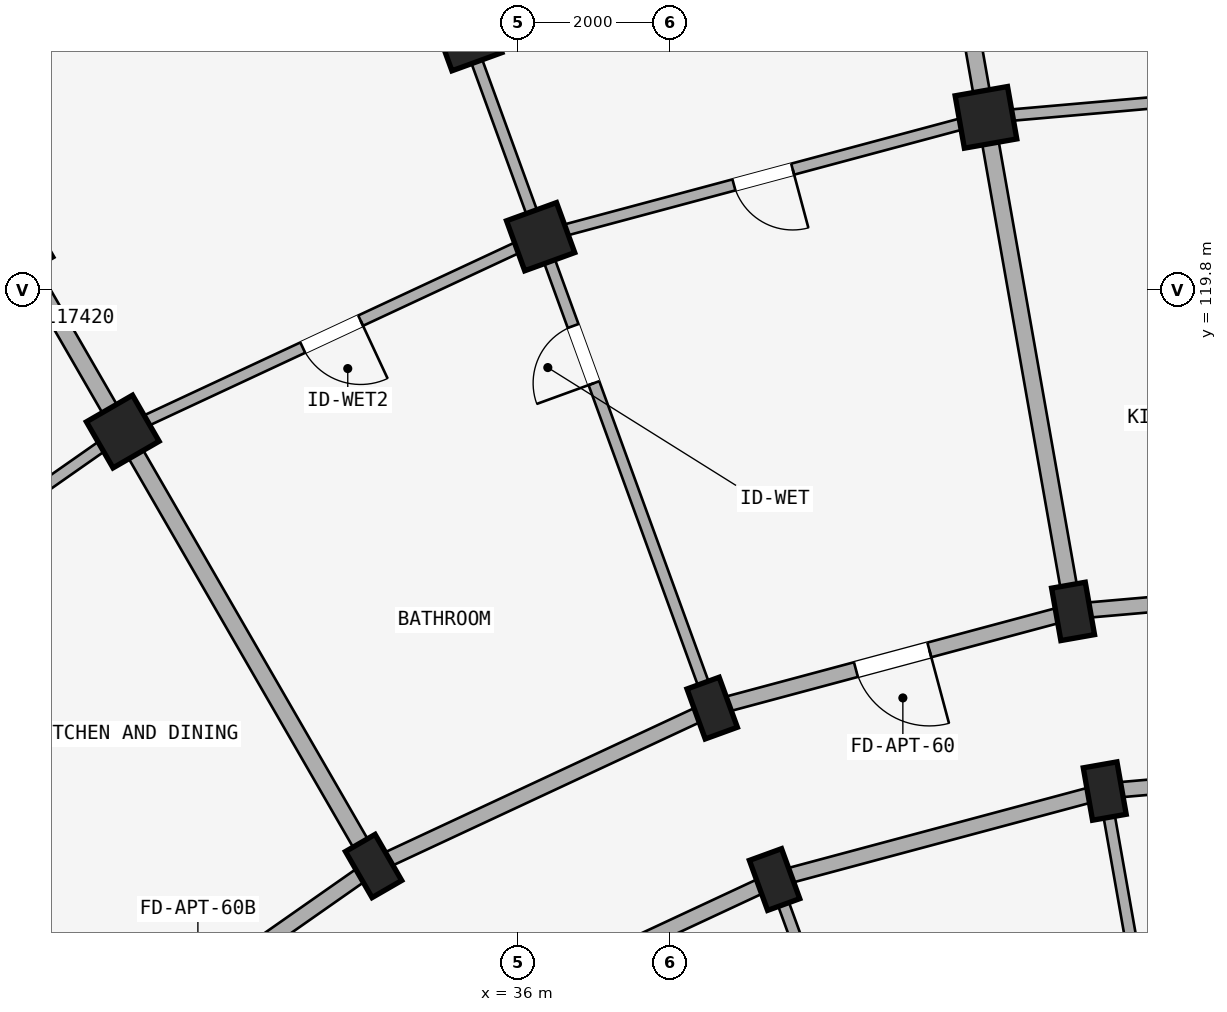
"""IFC4 building model, lengths in metres.
Left out: names, types, materials, properties, quantities, classifications, styles, units other than length and angle.
Written with IfcOpenShell. Run it as: python <this file> out.ifc"""

import sys

from ifc_helpers import new_model, si_unit, direction, frame, frame_2d, origin, origin_2d, place, context, subcontext, project, spatial, rectangle, extrude, element, fill, save


model = new_model("IFC4")
c1 = context("Model", 3, precision=1e-05, world=origin(), true_north=direction((0.0, 1.0)))
c2 = subcontext(c1, "Body", "Model", "MODEL_VIEW")
j1 = project(units=[si_unit("LENGTHUNIT", "METRE"), si_unit("PLANEANGLEUNIT", "RADIAN")], contexts=[c1])
p1 = place(None, origin())
s1 = spatial("IfcSite", under=j1, at=p1, CompositionType="ELEMENT")
p2 = place(p1, origin())
s2 = spatial("IfcBuilding", under=s1, at=p2, CompositionType="ELEMENT")
p3 = place(p2, frame((0.0, 0.0, 18.15)))
s3 = spatial("IfcBuildingStorey", under=s2, at=p3, CompositionType="ELEMENT", Elevation=18.15)
for number, where, z_axis, x_axis in (
    (1, (43.72, 113.208, 0.0), (0.0, 0.0, 1.0), (0.985, 0.174, 0.0)),
    (2, (43.303, 115.572, 0.0), (0.0, 0.0, 1.0), (0.985, 0.174, 0.0)),
):
    element("IfcColumn", number, at=place(p3, frame(where, z_axis=z_axis, x_axis=x_axis)), inside=s3, PredefinedType="COLUMN", context=c2, shape_type="SweptSolid", body=[
        extrude(rectangle(XDim=0.45, YDim=0.7, at=origin_2d()), origin(), (0.0, 0.0, 1.0), 2.93),
    ])
p4 = place(p3, frame((42.157, 122.071, 0.0), z_axis=(0.0, 0.0, 1.0), x_axis=(0.984807753012, 0.173648177667, 0.0)))
e3 = element("IfcColumn", 3, at=p4, inside=s3, PredefinedType="COLUMN", context=c2, shape_type="SweptSolid", body=[
    extrude(rectangle(XDim=0.7, YDim=0.7, at=origin_2d()), origin(), (0.0, 0.0, 1.0), 2.93),
])
for number, where, z_axis, x_axis in (
    (4, (39.376, 112.044, 0.0), (0.0, 0.0, 1.0), (0.94, 0.342, 0.0)),
    (5, (38.555, 114.299, 0.0), (0.0, 0.0, 1.0), (0.94, 0.342, 0.0)),
):
    element("IfcColumn", number, at=place(p3, frame(where, z_axis=z_axis, x_axis=x_axis)), inside=s3, PredefinedType="COLUMN", context=c2, shape_type="SweptSolid", body=[
        extrude(rectangle(XDim=0.45, YDim=0.7, at=origin_2d()), origin(), (0.0, 0.0, 1.0), 2.93),
    ])
for number, where, z_axis, x_axis in (
    (6, (36.298, 120.501, 0.0), (0.0, 0.0, 1.0), (0.94, 0.342, 0.0)),
    (7, (35.34, 123.132, 0.0), (0.0, 0.0, 1.0), (0.94, 0.342, 0.0)),
):
    element("IfcColumn", number, at=place(p3, frame(where, z_axis=z_axis, x_axis=x_axis)), inside=s3, PredefinedType="COLUMN", context=c2, shape_type="SweptSolid", body=[
        extrude(rectangle(XDim=0.7, YDim=0.7, at=origin_2d()), origin(), (0.0, 0.0, 1.0), 2.93),
    ])
p5 = place(p3, frame((34.1, 112.222, 0.0), z_axis=(0.0, 0.0, 1.0), x_axis=(0.866025403784, 0.5, 0.0)))
e8 = element("IfcColumn", 8, at=p5, inside=s3, PredefinedType="COLUMN", context=c2, shape_type="SweptSolid", body=[
    extrude(rectangle(XDim=0.45, YDim=0.7, at=origin_2d()), origin(), (0.0, 0.0, 1.0), 2.93),
])
for number, where, z_axis, x_axis in (
    (9, (30.8, 117.938, 0.0), (0.0, 0.0, 1.0), (0.866, 0.5, 0.0)),
    (10, (29.4, 120.363, 0.0), (0.0, 0.0, 1.0), (0.866, 0.5, 0.0)),
):
    element("IfcColumn", number, at=place(p3, frame(where, z_axis=z_axis, x_axis=x_axis)), inside=s3, PredefinedType="COLUMN", context=c2, shape_type="SweptSolid", body=[
        extrude(rectangle(XDim=0.7, YDim=0.7, at=origin_2d()), origin(), (0.0, 0.0, 1.0), 2.93),
    ])
p6 = place(p3, frame((48.2, 113.6, 0.0), z_axis=(0.0, 0.0, 1.0), x_axis=(-0.996191949488, -0.087187153726, 0.0)))
e11 = element("IfcWall", 11, at=p6, inside=s3, PredefinedType="STANDARD", context=c2, shape_type="SweptSolid", body=[
    extrude(rectangle(XDim=4.497, YDim=0.2, at=frame_2d((2.249, 0.0))), origin(), (0.0, 0.0, 1.0), 2.372),
])
p7 = place(p6, frame((1.729, 0.0, 0.0)))
e12 = element("IfcOpeningElement", 12, at=p7, cuts=e11, PredefinedType="OPENING", context=c2, shape_type="SweptSolid", body=[
    extrude(rectangle(XDim=1.04, YDim=2.15, at=frame_2d((0.52, 1.075))), frame((0.0, 0.11, 0.0), z_axis=(0.0, -1.0, 0.0), x_axis=(1.0, 0.0, 0.0)), (0.0, 0.0, 1.0), 0.22),
])
p8 = place(p3, frame((48.2, 116.0, 0.0), z_axis=(0.0, 0.0, 1.0), x_axis=(-0.996193663584, -0.087167566415, 0.0)))
e13 = element("IfcWall", 13, at=p8, inside=s3, PredefinedType="STANDARD", context=c2, shape_type="SweptSolid", body=[
    extrude(rectangle(XDim=4.916, YDim=0.2, at=frame_2d((2.458, 0.0))), origin(), (0.0, 0.0, 1.0), 2.372),
])
p9 = place(p8, frame((1.888, 0.0, 0.0)))
e14 = element("IfcOpeningElement", 14, at=p9, cuts=e13, PredefinedType="OPENING", context=c2, shape_type="SweptSolid", body=[
    extrude(rectangle(XDim=1.14, YDim=2.15, at=frame_2d((0.57, 1.075))), frame((0.0, 0.11, 0.0), z_axis=(0.0, -1.0, 0.0), x_axis=(1.0, 0.0, 0.0)), (0.0, 0.0, 1.0), 0.22),
])
p10 = place(p3, frame((43.72, 113.208, 0.0), z_axis=(0.0, 0.0, 1.0), x_axis=(-0.965934240054, -0.258787642463, 0.0)))
e15 = element("IfcWall", 15, at=p10, inside=s3, PredefinedType="STANDARD", context=c2, shape_type="SweptSolid", body=[
    extrude(rectangle(XDim=4.497, YDim=0.2, at=frame_2d((2.249, 0.0))), origin(), (0.0, 0.0, 1.0), 2.372),
])
p11 = place(p3, frame((43.303, 115.572, 0.0), z_axis=(0.0, 0.0, 1.0), x_axis=(-0.965930095386, -0.258803112091, 0.0)))
e16 = element("IfcWall", 16, at=p11, inside=s3, PredefinedType="STANDARD", context=c2, shape_type="SweptSolid", body=[
    extrude(rectangle(XDim=4.916, YDim=0.2, at=frame_2d((2.458, 0.0))), origin(), (0.0, 0.0, 1.0), 2.372),
])
p12 = place(p11, frame((1.958, 0.0, 0.0)))
e17 = element("IfcOpeningElement", 17, at=p12, cuts=e16, PredefinedType="OPENING", context=c2, shape_type="SweptSolid", body=[
    extrude(rectangle(XDim=1.0, YDim=2.15, at=frame_2d((0.5, 1.075))), frame((0.0, 0.11, 0.0), z_axis=(0.0, -1.0, 0.0), x_axis=(1.0, 0.0, 0.0)), (0.0, 0.0, 1.0), 0.22),
])
p13 = place(p3, frame((39.376, 112.044, 0.0), z_axis=(0.0, 0.0, 1.0), x_axis=(-0.906307919131, -0.422617978463, 0.0)))
e18 = element("IfcWall", 18, at=p13, inside=s3, PredefinedType="STANDARD", context=c2, shape_type="SweptSolid", body=[
    extrude(rectangle(XDim=4.497, YDim=0.2, at=frame_2d((2.249, 0.0))), origin(), (0.0, 0.0, 1.0), 2.372),
])
p14 = place(p3, frame((38.555, 114.299, 0.0), z_axis=(0.0, 0.0, 1.0), x_axis=(-0.906302381024, -0.422629854778, 0.0)))
e19 = element("IfcWall", 19, at=p14, inside=s3, PredefinedType="STANDARD", context=c2, shape_type="SweptSolid", body=[
    extrude(rectangle(XDim=4.915, YDim=0.2, at=frame_2d((2.458, 0.0))), origin(), (0.0, 0.0, 1.0), 2.372),
])
p15 = place(p3, frame((34.1, 112.222, 0.0), z_axis=(0.0, 0.0, 1.0), x_axis=(-0.819140911474, -0.573592335331, 0.0)))
e20 = element("IfcWall", 20, at=p15, inside=s3, PredefinedType="STANDARD", context=c2, shape_type="SweptSolid", body=[
    extrude(rectangle(XDim=4.916, YDim=0.2, at=frame_2d((2.458, 0.0))), origin(), (0.0, 0.0, 1.0), 2.372),
])
p16 = place(p15, frame((1.938, 0.0, 0.0)))
e21 = element("IfcOpeningElement", 21, at=p16, cuts=e20, PredefinedType="OPENING", context=c2, shape_type="SweptSolid", body=[
    extrude(rectangle(XDim=1.04, YDim=2.15, at=frame_2d((0.52, 1.075))), frame((0.0, 0.11, 0.0), z_axis=(0.0, -1.0, 0.0), x_axis=(1.0, 0.0, 0.0)), (0.0, 0.0, 1.0), 0.22),
])
p17 = place(p3, frame((44.901, 106.511, 0.0), z_axis=(0.0, 0.0, 1.0), x_axis=(-0.173647089161, 0.984807944945, 0.0)))
e22 = element("IfcWall", 22, at=p17, inside=s3, PredefinedType="PARTITIONING", context=c2, shape_type="SweptSolid", body=[
    extrude(rectangle(XDim=6.75, YDim=0.15, at=frame_2d((3.375, 0.0))), origin(), (0.0, 0.0, 1.0), 2.372),
])
p18 = place(p17, frame((3.242, 0.0, 0.0)))
e23 = element("IfcOpeningElement", 23, at=p18, cuts=e22, PredefinedType="OPENING", context=c2, shape_type="SweptSolid", body=[
    extrude(rectangle(XDim=0.94, YDim=2.1, at=frame_2d((0.47, 1.05))), frame((0.0, 0.085, 0.0), z_axis=(0.0, -1.0, 0.0), x_axis=(1.0, 0.0, 0.0)), (0.0, 0.0, 1.0), 0.17),
])
p19 = place(p3, frame((43.286, 115.67, 0.0), z_axis=(0.0, 0.0, 1.0), x_axis=(-0.173646216546, 0.984808098809, 0.0)))
e24 = element("IfcWall", 24, at=p19, inside=s3, PredefinedType="STANDARD", context=c2, shape_type="SweptSolid", body=[
    extrude(rectangle(XDim=17.42, YDim=0.22, at=frame_2d((8.71, 0.0))), origin(), (0.0, 0.0, 1.0), 2.372),
])
p20 = place(p3, frame((41.702, 105.654, 0.0), z_axis=(0.0, 0.0, 1.0), x_axis=(-0.342010221662, 0.939696231917, 0.0)))
e25 = element("IfcWall", 25, at=p20, inside=s3, PredefinedType="PARTITIONING", context=c2, shape_type="SweptSolid", body=[
    extrude(rectangle(XDim=6.75, YDim=0.15, at=frame_2d((3.375, 0.0))), origin(), (0.0, 0.0, 1.0), 2.372),
])
p21 = place(p20, frame((3.222, 0.0, 0.0)))
e26 = element("IfcOpeningElement", 26, at=p21, cuts=e25, PredefinedType="OPENING", context=c2, shape_type="SweptSolid", body=[
    extrude(rectangle(XDim=0.98, YDim=2.12, at=frame_2d((0.49, 1.06))), frame((0.0, 0.085, 0.0), z_axis=(0.0, -1.0, 0.0), x_axis=(1.0, 0.0, 0.0)), (0.0, 0.0, 1.0), 0.17),
])
p22 = place(p3, frame((38.521, 114.393, 0.0), z_axis=(0.0, 0.0, 1.0), x_axis=(-0.342022120477, 0.939691901159, 0.0)))
e27 = element("IfcWall", 27, at=p22, inside=s3, PredefinedType="PARTITIONING", context=c2, shape_type="SweptSolid", body=[
    extrude(rectangle(XDim=17.42, YDim=0.15, at=frame_2d((8.71, 0.0))), origin(), (0.0, 0.0, 1.0), 2.372),
])
p23 = place(p22, frame((4.45, 0.0, 0.0)))
e28 = element("IfcOpeningElement", 28, at=p23, cuts=e27, PredefinedType="OPENING", context=c2, shape_type="SweptSolid", body=[
    extrude(rectangle(XDim=0.8, YDim=2.1, at=frame_2d((0.4, 1.05))), frame((0.0, 0.085, 0.0), z_axis=(0.0, -1.0, 0.0), x_axis=(1.0, 0.0, 0.0)), (0.0, 0.0, 1.0), 0.17),
])
p24 = place(p3, frame((34.05, 112.309, 0.0), z_axis=(0.0, 0.0, 1.0), x_axis=(-0.499997843263, 0.866026648973, 0.0)))
e29 = element("IfcWall", 29, at=p24, inside=s3, PredefinedType="STANDARD", context=c2, shape_type="SweptSolid", body=[
    extrude(rectangle(XDim=17.42, YDim=0.22, at=frame_2d((8.71, 0.0))), origin(), (0.0, 0.0, 1.0), 2.372),
])
p25 = place(p3, frame((30.009, 109.479, 0.0), z_axis=(0.0, 0.0, 1.0), x_axis=(-0.642784757967, 0.766046835987, 0.0)))
e30 = element("IfcWall", 30, at=p25, inside=s3, PredefinedType="PARTITIONING", context=c2, shape_type="SweptSolid", body=[
    extrude(rectangle(XDim=17.42, YDim=0.15, at=frame_2d((8.71, 0.0))), origin(), (0.0, 0.0, 1.0), 2.372),
])
p26 = place(p25, frame((4.45, 0.0, 0.0)))
e31 = element("IfcOpeningElement", 31, at=p26, cuts=e30, PredefinedType="OPENING", context=c2, shape_type="SweptSolid", body=[
    extrude(rectangle(XDim=0.8, YDim=2.1, at=frame_2d((0.4, 1.05))), frame((0.0, 0.085, 0.0), z_axis=(0.0, -1.0, 0.0), x_axis=(1.0, 0.0, 0.0)), (0.0, 0.0, 1.0), 0.17),
])
p27 = place(p3, frame((48.2, 122.6, 0.0), z_axis=(0.0, 0.0, 1.0), x_axis=(-0.996193018494, -0.087174938512, 0.0)))
e32 = element("IfcWall", 32, at=p27, inside=s3, PredefinedType="PLUMBINGWALL", context=c2, shape_type="SweptSolid", body=[
    extrude(rectangle(XDim=6.066, YDim=0.15, at=frame_2d((3.033, 0.0))), origin(), (0.0, 0.0, 1.0), 2.372),
])
p28 = place(p27, frame((2.653, 0.0, 0.0)))
e33 = element("IfcOpeningElement", 33, at=p28, cuts=e32, PredefinedType="OPENING", context=c2, shape_type="SweptSolid", body=[
    extrude(rectangle(XDim=0.76, YDim=2.05, at=frame_2d((0.38, 1.025))), frame((0.0, 0.085, 0.0), z_axis=(0.0, -1.0, 0.0), x_axis=(1.0, 0.0, 0.0)), (0.0, 0.0, 1.0), 0.17),
])
p29 = place(p3, frame((42.157, 122.071, 0.0), z_axis=(0.0, 0.0, 1.0), x_axis=(-0.965923618901, -0.258827283048, 0.0)))
e34 = element("IfcWall", 34, at=p29, inside=s3, PredefinedType="PLUMBINGWALL", context=c2, shape_type="SweptSolid", body=[
    extrude(rectangle(XDim=6.066, YDim=0.15, at=frame_2d((3.033, 0.0))), origin(), (0.0, 0.0, 1.0), 2.372),
])
p30 = place(p29, frame((2.633, 0.0, 0.0)))
e35 = element("IfcOpeningElement", 35, at=p30, cuts=e34, PredefinedType="OPENING", context=c2, shape_type="SweptSolid", body=[
    extrude(rectangle(XDim=0.8, YDim=2.1, at=frame_2d((0.4, 1.05))), frame((0.0, 0.085, 0.0), z_axis=(0.0, -1.0, 0.0), x_axis=(1.0, 0.0, 0.0)), (0.0, 0.0, 1.0), 0.17),
])
p31 = place(p3, frame((36.298, 120.501, 0.0), z_axis=(0.0, 0.0, 1.0), x_axis=(-0.906312656069, -0.42260781991, 0.0)))
e36 = element("IfcWall", 36, at=p31, inside=s3, PredefinedType="PLUMBINGWALL", context=c2, shape_type="SweptSolid", body=[
    extrude(rectangle(XDim=6.066, YDim=0.15, at=frame_2d((3.033, 0.0))), origin(), (0.0, 0.0, 1.0), 2.372),
])
p32 = place(p31, frame((2.613, 0.0, 0.0)))
e37 = element("IfcOpeningElement", 37, at=p32, cuts=e36, PredefinedType="OPENING", context=c2, shape_type="SweptSolid", body=[
    extrude(rectangle(XDim=0.84, YDim=2.1, at=frame_2d((0.42, 1.05))), frame((0.0, 0.085, 0.0), z_axis=(0.0, -1.0, 0.0), x_axis=(1.0, 0.0, 0.0)), (0.0, 0.0, 1.0), 0.17),
])
p33 = place(p3, frame((30.8, 117.938, 0.0), z_axis=(0.0, 0.0, 1.0), x_axis=(-0.81913926159, -0.573594691504, 0.0)))
e38 = element("IfcWall", 38, at=p33, inside=s3, PredefinedType="PLUMBINGWALL", context=c2, shape_type="SweptSolid", body=[
    extrude(rectangle(XDim=6.066, YDim=0.15, at=frame_2d((3.033, 0.0))), origin(), (0.0, 0.0, 1.0), 2.372),
])
p34 = place(p33, frame((2.653, 0.0, 0.0)))
e39 = element("IfcOpeningElement", 39, at=p34, cuts=e38, PredefinedType="OPENING", context=c2, shape_type="SweptSolid", body=[
    extrude(rectangle(XDim=0.76, YDim=2.05, at=frame_2d((0.38, 1.025))), frame((0.0, 0.085, 0.0), z_axis=(0.0, -1.0, 0.0), x_axis=(1.0, 0.0, 0.0)), (0.0, 0.0, 1.0), 0.17),
])
p35 = place(p23, frame((0.8, 0.0, 0.0), z_axis=(0.0, 0.0, 1.0), x_axis=(-1.0, 0.0, 0.0)))
e40 = element("IfcDoor", 40, at=p35, inside=s3, OperationType="SINGLE_SWING_RIGHT", PredefinedType="DOOR", context=c2, shape_type="SweptSolid", body=[
    extrude(rectangle(XDim=0.8, YDim=2.1, at=frame_2d((0.4, 1.05))), frame((0.0, 0.025, 0.0), z_axis=(0.0, -1.0, 0.0), x_axis=(1.0, 0.0, 0.0)), (0.0, 0.0, 1.0), 0.05),
])
fill(e28, e40)
p36 = place(p12, frame((1.0, 0.0, 0.0), z_axis=(0.0, 0.0, 1.0), x_axis=(-1.0, 0.0, 0.0)))
e41 = element("IfcDoor", 41, at=p36, inside=s3, OperationType="SINGLE_SWING_RIGHT", PredefinedType="DOOR", context=c2, shape_type="SweptSolid", body=[
    extrude(rectangle(XDim=1.0, YDim=2.15, at=frame_2d((0.5, 1.075))), frame((0.0, 0.025, 0.0), z_axis=(0.0, -1.0, 0.0), x_axis=(1.0, 0.0, 0.0)), (0.0, 0.0, 1.0), 0.05),
])
fill(e17, e41)
p37 = place(p30, origin())
e42 = element("IfcDoor", 42, at=p37, inside=s3, OperationType="SINGLE_SWING_LEFT", PredefinedType="DOOR", context=c2, shape_type="SweptSolid", body=[
    extrude(rectangle(XDim=0.8, YDim=2.1, at=frame_2d((0.4, 1.05))), frame((0.0, 0.025, 0.0), z_axis=(0.0, -1.0, 0.0), x_axis=(1.0, 0.0, 0.0)), (0.0, 0.0, 1.0), 0.05),
])
fill(e35, e42)
p38 = place(p32, frame((0.84, 0.0, 0.0), z_axis=(0.0, 0.0, 1.0), x_axis=(-1.0, 0.0, 0.0)))
e43 = element("IfcDoor", 43, at=p38, inside=s3, OperationType="SINGLE_SWING_RIGHT", PredefinedType="DOOR", context=c2, shape_type="SweptSolid", body=[
    extrude(rectangle(XDim=0.84, YDim=2.1, at=frame_2d((0.42, 1.05))), frame((0.0, 0.025, 0.0), z_axis=(0.0, -1.0, 0.0), x_axis=(1.0, 0.0, 0.0)), (0.0, 0.0, 1.0), 0.05),
])
fill(e37, e43)
save(model, sys.argv[1])
